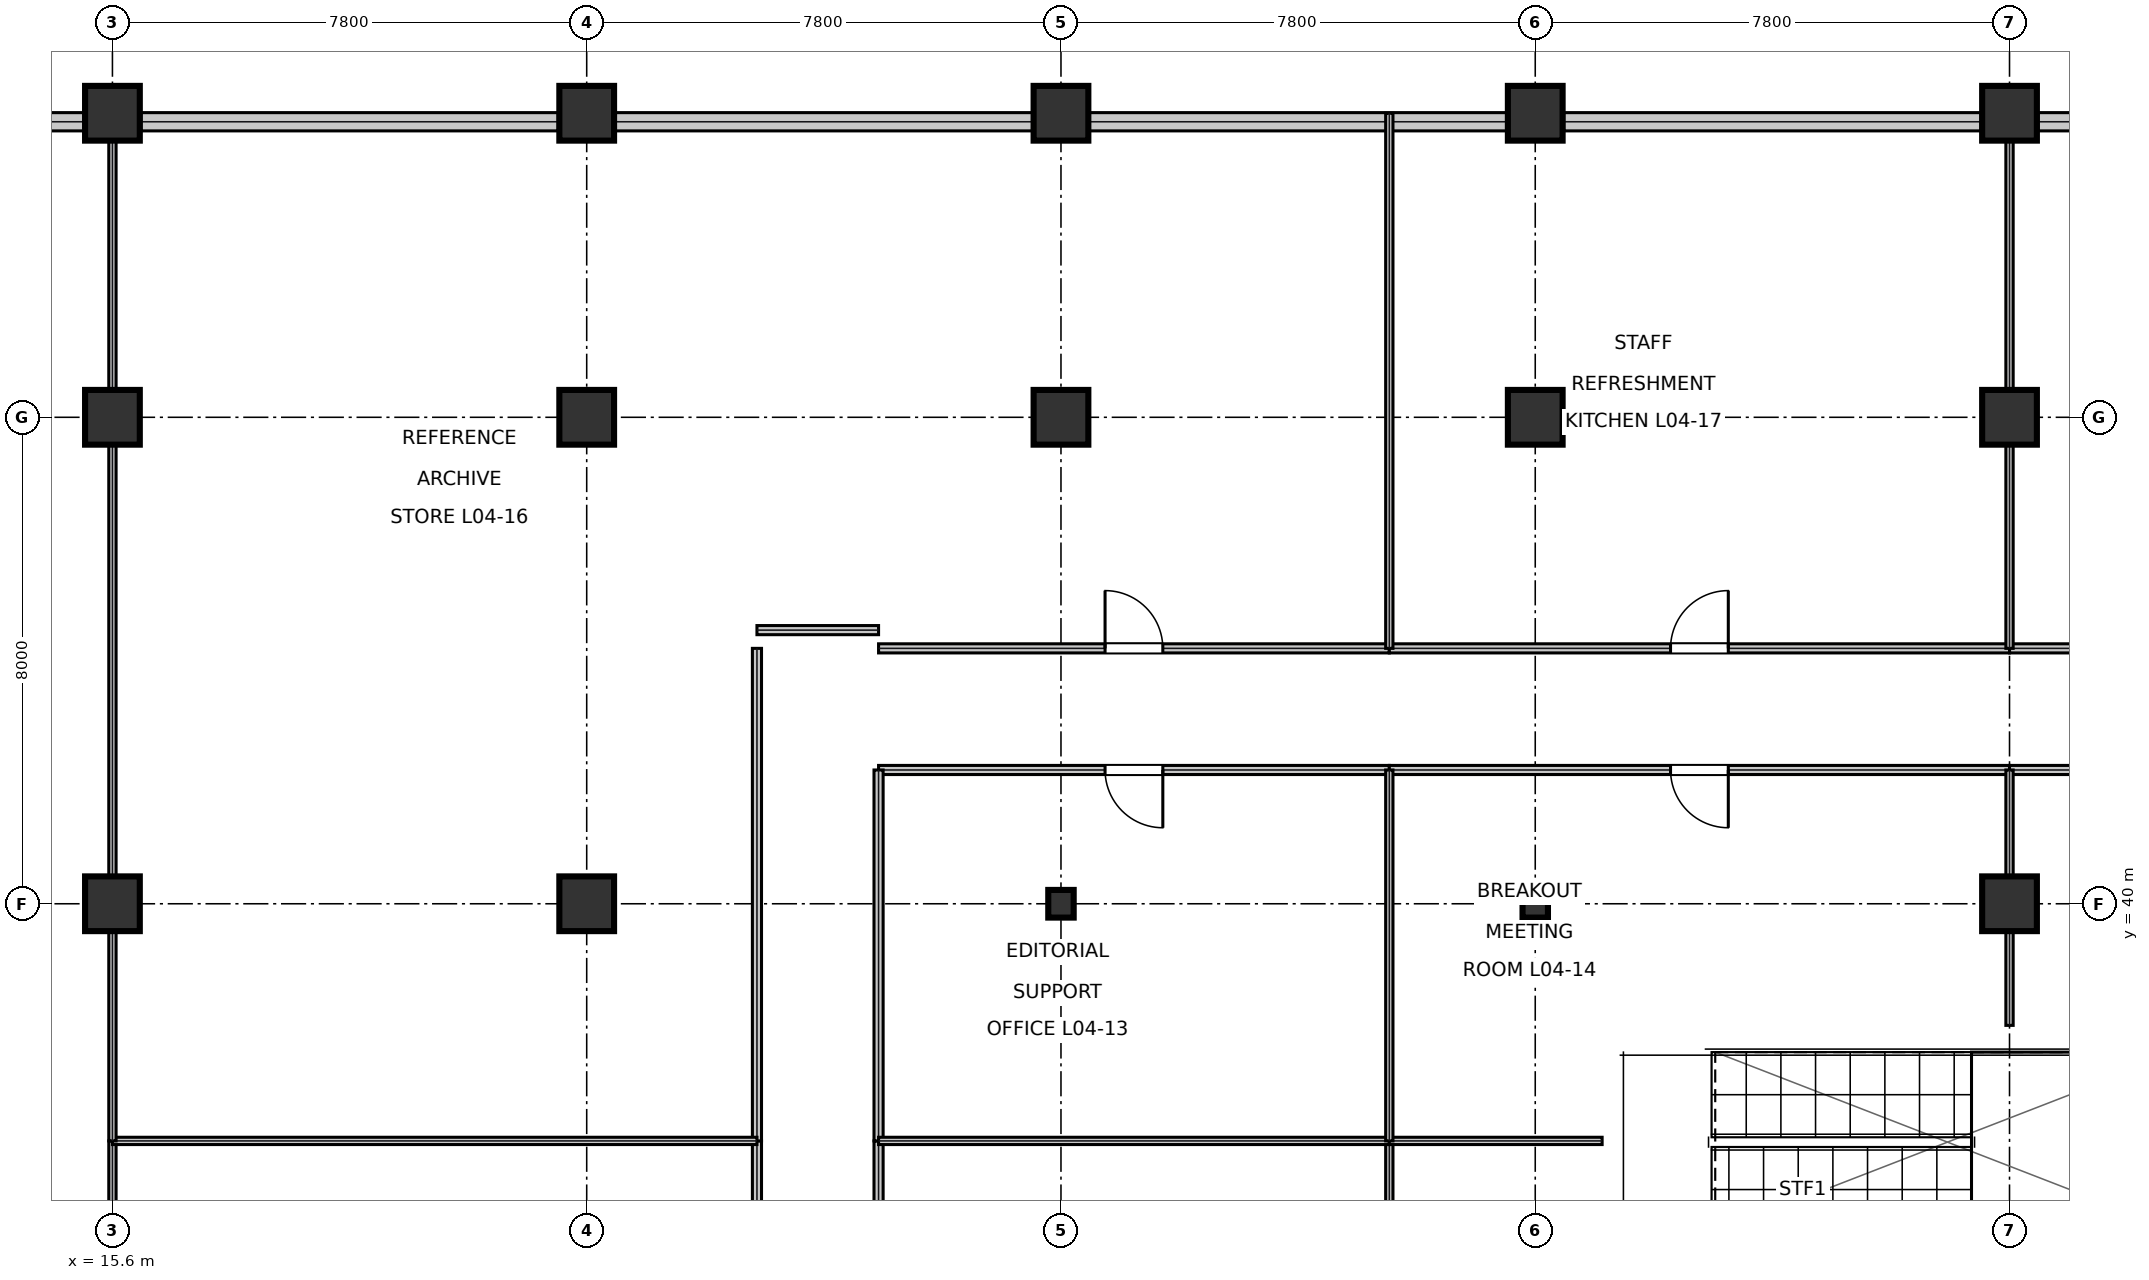
"""IFC4 building model, lengths in metres.
Left out: names, types, materials, properties, quantities, classifications, styles, units other than length and angle.
Written with IfcOpenShell. Run it as: python <this file> out.ifc"""

import sys

from ifc_helpers import new_model, si_unit, direction, frame, frame_2d, origin, origin_2d, place, context, subcontext, project, spatial, rectangle, i_section, extrude, element, fill, save


model = new_model("IFC4")
c1 = context("Model", 3, precision=1e-05, world=origin(), true_north=direction((0.0, 1.0)))
c2 = subcontext(c1, "Body", "Model", "MODEL_VIEW")
j1 = project(units=[si_unit("LENGTHUNIT", "METRE"), si_unit("PLANEANGLEUNIT", "RADIAN")], contexts=[c1])
p1 = place(None, origin())
s1 = spatial("IfcSite", under=j1, at=p1, CompositionType="ELEMENT")
p2 = place(p1, origin())
s2 = spatial("IfcBuilding", under=s1, at=p2, CompositionType="ELEMENT")
p3 = place(p2, frame((0.0, 0.0, 21.6)))
s3 = spatial("IfcBuildingStorey", under=s2, at=p3, CompositionType="ELEMENT", Elevation=21.6)
for number, where, z_axis, x_axis in (
    (1, (15.6, 40.0, 0.0), (0.0, 0.0, 1.0), (1.0, 0.0, 0.0)),
    (2, (15.6, 48.0, 0.0), (0.0, 0.0, 1.0), (1.0, 0.0, 0.0)),
    (3, (15.6, 53.0, 0.0), (0.0, 0.0, 1.0), (1.0, 0.0, 0.0)),
    (4, (23.4, 40.0, 0.0), (0.0, 0.0, 1.0), (1.0, 0.0, 0.0)),
    (5, (23.4, 48.0, 0.0), (0.0, 0.0, 1.0), (1.0, 0.0, 0.0)),
    (6, (23.4, 53.0, 0.0), (0.0, 0.0, 1.0), (1.0, 0.0, 0.0)),
):
    element("IfcColumn", number, at=place(p3, frame(where, z_axis=z_axis, x_axis=x_axis)), inside=s3, PredefinedType="COLUMN", context=c2, shape_type="SweptSolid", body=[
        extrude(rectangle(XDim=0.9, YDim=0.9, at=origin_2d()), origin(), (0.0, 0.0, 1.0), 5.395),
    ])
p4 = place(p3, frame((31.2, 40.0, 0.0), z_axis=(0.0, 0.0, 1.0), x_axis=(1.0, 0.0, 0.0)))
e7 = element("IfcColumn", 7, at=p4, inside=s3, PredefinedType="COLUMN", context=c2, shape_type="SweptSolid", body=[
    extrude(i_section(OverallWidth=0.418, OverallDepth=0.455, WebThickness=0.042, FlangeThickness=0.068, at=origin_2d()), origin(), (0.0, 0.0, 1.0), 5.395),
])
for number, where, z_axis, x_axis in (
    (8, (31.2, 48.0, 0.0), (0.0, 0.0, 1.0), (1.0, 0.0, 0.0)),
    (9, (31.2, 53.0, 0.0), (0.0, 0.0, 1.0), (1.0, 0.0, 0.0)),
):
    element("IfcColumn", number, at=place(p3, frame(where, z_axis=z_axis, x_axis=x_axis)), inside=s3, PredefinedType="COLUMN", context=c2, shape_type="SweptSolid", body=[
        extrude(rectangle(XDim=0.9, YDim=0.9, at=origin_2d()), origin(), (0.0, 0.0, 1.0), 5.395),
    ])
p5 = place(p3, frame((39.0, 40.0, 0.0), z_axis=(0.0, 0.0, 1.0), x_axis=(1.0, 0.0, 0.0)))
e10 = element("IfcColumn", 10, at=p5, inside=s3, PredefinedType="COLUMN", context=c2, shape_type="SweptSolid", body=[
    extrude(i_section(OverallWidth=0.418, OverallDepth=0.455, WebThickness=0.042, FlangeThickness=0.068, at=origin_2d()), origin(), (0.0, 0.0, 1.0), 5.395),
])
for number, where, z_axis, x_axis in (
    (11, (39.0, 48.0, 0.0), (0.0, 0.0, 1.0), (1.0, 0.0, 0.0)),
    (12, (39.0, 53.0, 0.0), (0.0, 0.0, 1.0), (1.0, 0.0, 0.0)),
    (13, (46.8, 40.0, 0.0), (0.0, 0.0, 1.0), (1.0, 0.0, 0.0)),
    (14, (46.8, 48.0, 0.0), (0.0, 0.0, 1.0), (1.0, 0.0, 0.0)),
    (15, (46.8, 53.0, 0.0), (0.0, 0.0, 1.0), (1.0, 0.0, 0.0)),
):
    element("IfcColumn", number, at=place(p3, frame(where, z_axis=z_axis, x_axis=x_axis)), inside=s3, PredefinedType="COLUMN", context=c2, shape_type="SweptSolid", body=[
        extrude(rectangle(XDim=0.9, YDim=0.9, at=origin_2d()), origin(), (0.0, 0.0, 1.0), 5.395),
    ])
for number, where, z_axis, x_axis in (
    (16, (54.132, 52.86, 0.0), (0.0, 0.0, 1.0), (-1.0, 0.0, 0.0)),
    (17, (46.332, 52.86, 0.0), (0.0, 0.0, 1.0), (-1.0, 0.0, 0.0)),
    (18, (38.532, 52.86, 0.0), (0.0, 0.0, 1.0), (-1.0, 0.0, 0.0)),
    (19, (30.732, 52.86, 0.0), (0.0, 0.0, 1.0), (-1.0, 0.0, 0.0)),
):
    element("IfcWall", number, at=place(p3, frame(where, z_axis=z_axis, x_axis=x_axis)), inside=s3, PredefinedType="STANDARD", context=c2, shape_type="SweptSolid", body=[
        extrude(rectangle(XDim=6.864, YDim=0.3, at=frame_2d((3.432, 0.0))), origin(), (0.0, 0.0, 1.0), 4.608),
    ])
p6 = place(p3, frame((22.932, 52.86, 0.0), z_axis=(0.0, 0.0, 1.0), x_axis=(-1.0, 0.0, 0.0)))
e20 = element("IfcWall", 20, at=p6, inside=s3, PredefinedType="STANDARD", context=c2, shape_type="SweptSolid", body=[
    extrude(rectangle(XDim=6.864, YDim=0.3, at=frame_2d((3.432, 0.0))), origin(), (0.0, 0.0, 1.0), 4.608),
])
p7 = place(p3, frame((15.132, 52.86, 0.0), z_axis=(0.0, 0.0, 1.0), x_axis=(-1.0, 0.0, 0.0)))
e21 = element("IfcWall", 21, at=p7, inside=s3, PredefinedType="STANDARD", context=c2, shape_type="SweptSolid", body=[
    extrude(rectangle(XDim=6.864, YDim=0.3, at=frame_2d((3.432, 0.0))), origin(), (0.0, 0.0, 1.0), 4.608),
])
p8 = place(p3, frame((28.2, 42.2, 0.0), z_axis=(0.0, 0.0, 1.0), x_axis=(1.0, 0.0, 0.0)))
e22 = element("IfcWall", 22, at=p8, inside=s3, PredefinedType="PARTITIONING", context=c2, shape_type="SweptSolid", body=[
    extrude(rectangle(XDim=8.4, YDim=0.15, at=frame_2d((4.2, 0.0))), origin(), (0.0, 0.0, 1.0), 4.375),
])
p9 = place(p8, frame((3.725, 0.0, 0.0)))
e23 = element("IfcOpeningElement", 23, at=p9, cuts=e22, PredefinedType="OPENING", context=c2, shape_type="SweptSolid", body=[
    extrude(rectangle(XDim=0.95, YDim=2.15, at=frame_2d((0.475, 1.075))), frame((0.0, 0.085, 0.0), z_axis=(0.0, -1.0, 0.0), x_axis=(1.0, 0.0, 0.0)), (0.0, 0.0, 1.0), 0.17),
])
p10 = place(p3, frame((36.6, 42.2, 0.0), z_axis=(0.0, 0.0, 1.0), x_axis=(1.0, 0.0, 0.0)))
e24 = element("IfcWall", 24, at=p10, inside=s3, PredefinedType="PARTITIONING", context=c2, shape_type="SweptSolid", body=[
    extrude(rectangle(XDim=10.2, YDim=0.15, at=frame_2d((5.1, 0.0))), origin(), (0.0, 0.0, 1.0), 4.375),
])
p11 = place(p10, frame((4.625, 0.0, 0.0)))
e25 = element("IfcOpeningElement", 25, at=p11, cuts=e24, PredefinedType="OPENING", context=c2, shape_type="SweptSolid", body=[
    extrude(rectangle(XDim=0.95, YDim=2.15, at=frame_2d((0.475, 1.075))), frame((0.0, 0.085, 0.0), z_axis=(0.0, -1.0, 0.0), x_axis=(1.0, 0.0, 0.0)), (0.0, 0.0, 1.0), 0.17),
])
p12 = place(p3, frame((46.8, 44.2, 0.0), z_axis=(0.0, 0.0, 1.0), x_axis=(1.0, 0.0, 0.0)))
e26 = element("IfcWall", 26, at=p12, inside=s3, PredefinedType="PARTITIONING", context=c2, shape_type="SweptSolid", body=[
    extrude(rectangle(XDim=5.7, YDim=0.15, at=frame_2d((2.85, 0.0))), origin(), (0.0, 0.0, 1.0), 4.375),
])
p13 = place(p12, frame((2.375, 0.0, 0.0)))
e27 = element("IfcOpeningElement", 27, at=p13, cuts=e26, PredefinedType="OPENING", context=c2, shape_type="SweptSolid", body=[
    extrude(rectangle(XDim=0.95, YDim=2.15, at=frame_2d((0.475, 1.075))), frame((0.0, 0.085, 0.0), z_axis=(0.0, -1.0, 0.0), x_axis=(1.0, 0.0, 0.0)), (0.0, 0.0, 1.0), 0.17),
])
p14 = place(p3, frame((28.2, 44.2, 0.0), z_axis=(0.0, 0.0, 1.0), x_axis=(1.0, 0.0, 0.0)))
e28 = element("IfcWall", 28, at=p14, inside=s3, PredefinedType="PARTITIONING", context=c2, shape_type="SweptSolid", body=[
    extrude(rectangle(XDim=8.4, YDim=0.15, at=frame_2d((4.2, 0.0))), origin(), (0.0, 0.0, 1.0), 4.375),
])
p15 = place(p14, frame((3.725, 0.0, 0.0)))
e29 = element("IfcOpeningElement", 29, at=p15, cuts=e28, PredefinedType="OPENING", context=c2, shape_type="SweptSolid", body=[
    extrude(rectangle(XDim=0.95, YDim=2.15, at=frame_2d((0.475, 1.075))), frame((0.0, 0.085, 0.0), z_axis=(0.0, -1.0, 0.0), x_axis=(1.0, 0.0, 0.0)), (0.0, 0.0, 1.0), 0.17),
])
p16 = place(p3, frame((36.6, 44.2, 0.0), z_axis=(0.0, 0.0, 1.0), x_axis=(1.0, 0.0, 0.0)))
e30 = element("IfcWall", 30, at=p16, inside=s3, PredefinedType="PARTITIONING", context=c2, shape_type="SweptSolid", body=[
    extrude(rectangle(XDim=10.2, YDim=0.15, at=frame_2d((5.1, 0.0))), origin(), (0.0, 0.0, 1.0), 4.375),
])
p17 = place(p16, frame((4.625, 0.0, 0.0)))
e31 = element("IfcOpeningElement", 31, at=p17, cuts=e30, PredefinedType="OPENING", context=c2, shape_type="SweptSolid", body=[
    extrude(rectangle(XDim=0.95, YDim=2.15, at=frame_2d((0.475, 1.075))), frame((0.0, 0.085, 0.0), z_axis=(0.0, -1.0, 0.0), x_axis=(1.0, 0.0, 0.0)), (0.0, 0.0, 1.0), 0.17),
])
for number, where, z_axis, x_axis in (
    (32, (26.2, 28.2, 0.0), (0.0, 0.0, 1.0), (0.0, 1.0, 0.0)),
    (33, (28.2, 28.2, 0.0), (0.0, 0.0, 1.0), (0.0, 1.0, 0.0)),
):
    element("IfcWall", number, at=place(p3, frame(where, z_axis=z_axis, x_axis=x_axis)), inside=s3, PredefinedType="PARTITIONING", context=c2, shape_type="SweptSolid", body=[
        extrude(rectangle(XDim=7.9, YDim=0.15, at=frame_2d((3.95, 0.0))), origin(), (0.0, 0.0, 1.0), 4.298),
    ])
p18 = place(p3, frame((28.2, 36.1, 0.0), z_axis=(0.0, 0.0, 1.0), x_axis=(0.0, 1.0, 0.0)))
e34 = element("IfcWall", 34, at=p18, inside=s3, PredefinedType="PARTITIONING", context=c2, shape_type="SweptSolid", body=[
    extrude(rectangle(XDim=6.1, YDim=0.15, at=frame_2d((3.05, 0.0))), origin(), (0.0, 0.0, 1.0), 4.298),
])
p19 = place(p3, frame((46.8, 42.2, 0.0), z_axis=(0.0, 0.0, 1.0), x_axis=(1.0, 0.0, 0.0)))
e35 = element("IfcWall", 35, at=p19, inside=s3, PredefinedType="PARTITIONING", context=c2, shape_type="SweptSolid", body=[
    extrude(rectangle(XDim=5.7, YDim=0.15, at=frame_2d((2.85, 0.0))), origin(), (0.0, 0.0, 1.0), 4.375),
])
p20 = place(p3, frame((26.2, 36.1, 0.0), z_axis=(0.0, 0.0, 1.0), x_axis=(0.0, 1.0, 0.0)))
e36 = element("IfcWall", 36, at=p20, inside=s3, PredefinedType="PARTITIONING", context=c2, shape_type="SweptSolid", body=[
    extrude(rectangle(XDim=8.1, YDim=0.15, at=frame_2d((4.05, 0.0))), origin(), (0.0, 0.0, 1.0), 4.298),
])
p21 = place(p3, frame((26.2, 44.5, 0.0), z_axis=(0.0, 0.0, 1.0), x_axis=(1.0, 0.0, 0.0)))
e37 = element("IfcWall", 37, at=p21, inside=s3, PredefinedType="PARTITIONING", context=c2, shape_type="SweptSolid", body=[
    extrude(rectangle(XDim=2.0, YDim=0.15, at=frame_2d((1.0, 0.0))), origin(), (0.0, 0.0, 1.0), 4.661),
])
p22 = place(p3, frame((15.6, 28.2, 0.0), z_axis=(0.0, 0.0, 1.0), x_axis=(0.0, 1.0, 0.0)))
e38 = element("IfcWall", 38, at=p22, inside=s3, PredefinedType="PARTITIONING", context=c2, shape_type="SweptSolid", body=[
    extrude(rectangle(XDim=7.9, YDim=0.12, at=frame_2d((3.95, 0.0))), origin(), (0.0, 0.0, 1.0), 3.648),
])
p23 = place(p3, frame((15.6, 36.1, 0.0), z_axis=(0.0, 0.0, 1.0), x_axis=(1.0, 0.0, 0.0)))
e39 = element("IfcWall", 39, at=p23, inside=s3, PredefinedType="PARTITIONING", context=c2, shape_type="SweptSolid", body=[
    extrude(rectangle(XDim=10.6, YDim=0.12, at=frame_2d((5.3, 0.0))), origin(), (0.0, 0.0, 1.0), 3.648),
])
p24 = place(p3, frame((36.6, 28.2, 0.0), z_axis=(0.0, 0.0, 1.0), x_axis=(0.0, 1.0, 0.0)))
e40 = element("IfcWall", 40, at=p24, inside=s3, PredefinedType="PARTITIONING", context=c2, shape_type="SweptSolid", body=[
    extrude(rectangle(XDim=7.9, YDim=0.12, at=frame_2d((3.95, 0.0))), origin(), (0.0, 0.0, 1.0), 4.298),
])
p25 = place(p3, frame((28.2, 36.1, 0.0), z_axis=(0.0, 0.0, 1.0), x_axis=(1.0, 0.0, 0.0)))
e41 = element("IfcWall", 41, at=p25, inside=s3, PredefinedType="PARTITIONING", context=c2, shape_type="SweptSolid", body=[
    extrude(rectangle(XDim=8.4, YDim=0.12, at=frame_2d((4.2, 0.0))), origin(), (0.0, 0.0, 1.0), 4.375),
])
p26 = place(p3, frame((36.6, 36.1, 0.0), z_axis=(0.0, 0.0, 1.0), x_axis=(1.0, 0.0, 0.0)))
e42 = element("IfcWall", 42, at=p26, inside=s3, PredefinedType="PARTITIONING", context=c2, shape_type="SweptSolid", body=[
    extrude(rectangle(XDim=3.5, YDim=0.12, at=frame_2d((1.75, 0.0))), origin(), (0.0, 0.0, 1.0), 4.375),
])
p27 = place(p3, frame((15.6, 36.1, 0.0), z_axis=(0.0, 0.0, 1.0), x_axis=(0.0, 1.0, 0.0)))
e43 = element("IfcWall", 43, at=p27, inside=s3, PredefinedType="PARTITIONING", context=c2, shape_type="SweptSolid", body=[
    extrude(rectangle(XDim=16.9, YDim=0.12, at=frame_2d((8.45, 0.0))), origin(), (0.0, 0.0, 1.0), 3.648),
])
p28 = place(p3, frame((36.6, 36.1, 0.0), z_axis=(0.0, 0.0, 1.0), x_axis=(0.0, 1.0, 0.0)))
e44 = element("IfcWall", 44, at=p28, inside=s3, PredefinedType="PARTITIONING", context=c2, shape_type="SweptSolid", body=[
    extrude(rectangle(XDim=6.1, YDim=0.12, at=frame_2d((3.05, 0.0))), origin(), (0.0, 0.0, 1.0), 4.298),
])
p29 = place(p3, frame((46.8, 38.0, 0.0), z_axis=(0.0, 0.0, 1.0), x_axis=(0.0, 1.0, 0.0)))
e45 = element("IfcWall", 45, at=p29, inside=s3, PredefinedType="PARTITIONING", context=c2, shape_type="SweptSolid", body=[
    extrude(rectangle(XDim=4.2, YDim=0.12, at=frame_2d((2.1, 0.0))), origin(), (0.0, 0.0, 1.0), 4.298),
])
for number, where, z_axis, x_axis in (
    (46, (46.8, 44.2, 0.0), (0.0, 0.0, 1.0), (0.0, 1.0, 0.0)),
    (47, (36.6, 44.2, 0.0), (0.0, 0.0, 1.0), (0.0, 1.0, 0.0)),
):
    element("IfcWall", number, at=place(p3, frame(where, z_axis=z_axis, x_axis=x_axis)), inside=s3, PredefinedType="PARTITIONING", context=c2, shape_type="SweptSolid", body=[
        extrude(rectangle(XDim=8.8, YDim=0.12, at=frame_2d((4.4, 0.0))), origin(), (0.0, 0.0, 1.0), 4.298),
    ])
p30 = place(p9, frame((0.95, 0.0, 0.0), z_axis=(0.0, 0.0, 1.0), x_axis=(-1.0, 0.0, 0.0)))
e48 = element("IfcDoor", 48, at=p30, inside=s3, OperationType="SINGLE_SWING_LEFT", PredefinedType="DOOR", context=c2, shape_type="SweptSolid", body=[
    extrude(rectangle(XDim=0.95, YDim=2.15, at=frame_2d((0.475, 1.075))), frame((0.0, 0.025, 0.0), z_axis=(0.0, -1.0, 0.0), x_axis=(1.0, 0.0, 0.0)), (0.0, 0.0, 1.0), 0.05),
])
fill(e23, e48)
p31 = place(p11, frame((0.95, 0.0, 0.0), z_axis=(0.0, 0.0, 1.0), x_axis=(-1.0, 0.0, 0.0)))
e49 = element("IfcDoor", 49, at=p31, inside=s3, OperationType="SINGLE_SWING_LEFT", PredefinedType="DOOR", context=c2, shape_type="SweptSolid", body=[
    extrude(rectangle(XDim=0.95, YDim=2.15, at=frame_2d((0.475, 1.075))), frame((0.0, 0.025, 0.0), z_axis=(0.0, -1.0, 0.0), x_axis=(1.0, 0.0, 0.0)), (0.0, 0.0, 1.0), 0.05),
])
fill(e25, e49)
p32 = place(p15, origin())
e50 = element("IfcDoor", 50, at=p32, inside=s3, OperationType="SINGLE_SWING_LEFT", PredefinedType="DOOR", context=c2, shape_type="SweptSolid", body=[
    extrude(rectangle(XDim=0.95, YDim=2.15, at=frame_2d((0.475, 1.075))), frame((0.0, 0.025, 0.0), z_axis=(0.0, -1.0, 0.0), x_axis=(1.0, 0.0, 0.0)), (0.0, 0.0, 1.0), 0.05),
])
fill(e29, e50)
p33 = place(p17, origin())
e51 = element("IfcDoor", 51, at=p33, inside=s3, OperationType="SINGLE_SWING_RIGHT", PredefinedType="DOOR", context=c2, shape_type="SweptSolid", body=[
    extrude(rectangle(XDim=0.95, YDim=2.15, at=frame_2d((0.475, 1.075))), frame((0.0, 0.025, 0.0), z_axis=(0.0, -1.0, 0.0), x_axis=(1.0, 0.0, 0.0)), (0.0, 0.0, 1.0), 0.05),
])
fill(e31, e51)
save(model, sys.argv[1])
